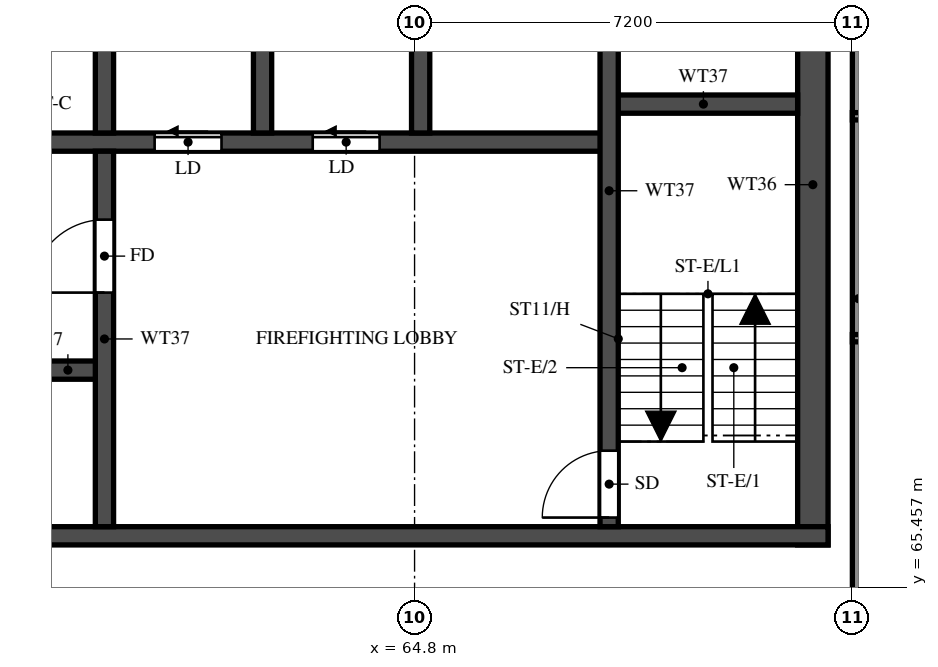
"""IFC4 building model, lengths in metres.
Left out: names, types, materials, properties, quantities, classifications, styles, units other than length and angle.
Written with IfcOpenShell. Run it as: python <this file> out.ifc"""

import sys

from ifc_helpers import new_model, si_unit, direction, frame, frame_2d, origin, place, context, subcontext, project, spatial, rectangle, extrude, element, fill, save


model = new_model("IFC4")
c1 = context("Model", 3, precision=1e-05, world=origin(), true_north=direction((0.0, 1.0)))
c2 = subcontext(c1, "Body", "Model", "MODEL_VIEW")
j1 = project(units=[si_unit("LENGTHUNIT", "METRE"), si_unit("PLANEANGLEUNIT", "RADIAN")], contexts=[c1])
p1 = place(None, origin())
s1 = spatial("IfcSite", under=j1, at=p1, CompositionType="ELEMENT")
p2 = place(p1, origin())
s2 = spatial("IfcBuilding", under=s1, at=p2, CompositionType="ELEMENT")
p3 = place(p2, frame((0.0, 0.0, 229.0)))
s3 = spatial("IfcBuildingStorey", under=s2, at=p3, CompositionType="ELEMENT", Elevation=229.0)
p4 = place(p3, frame((71.35, 66.15, 0.0), z_axis=(0.0, 0.0, 1.0), x_axis=(0.0, 1.0, 0.0)))
e1 = element("IfcWall", 1, at=p4, inside=s3, PredefinedType="SHEAR", context=c2, shape_type="SweptSolid", body=[
    extrude(rectangle(XDim=11.85, YDim=0.5, at=frame_2d((5.925, 0.0))), origin(), (0.0, 0.0, 1.0), 3.22),
])
p5 = place(p3, frame((29.2, 66.3, 0.0), z_axis=(0.0, 0.0, 1.0), x_axis=(1.0, 0.0, 0.0)))
e2 = element("IfcWall", 2, at=p5, inside=s3, PredefinedType="SHEAR", context=c2, shape_type="SweptSolid", body=[
    extrude(rectangle(XDim=42.4, YDim=0.3, at=frame_2d((21.2, 0.0))), origin(), (0.0, 0.0, 1.0), 3.22),
])
p6 = place(p5, frame((1.425, 0.0, 0.0)))
e3 = element("IfcOpeningElement", 3, at=p6, cuts=e2, PredefinedType="OPENING", context=c2, shape_type="SweptSolid", body=[
    extrude(rectangle(XDim=1.1, YDim=2.1, at=frame_2d((0.55, 1.05))), frame((0.0, 0.16, 0.0), z_axis=(0.0, -1.0, 0.0), x_axis=(1.0, 0.0, 0.0)), (0.0, 0.0, 1.0), 0.32),
])
p7 = place(p5, frame((4.2, 0.0, 0.0)))
e4 = element("IfcOpeningElement", 4, at=p7, cuts=e2, PredefinedType="OPENING", context=c2, shape_type="SweptSolid", body=[
    extrude(rectangle(XDim=1.8, YDim=2.1, at=frame_2d((0.9, 1.05))), frame((0.0, 0.16, 0.0), z_axis=(0.0, -1.0, 0.0), x_axis=(1.0, 0.0, 0.0)), (0.0, 0.0, 1.0), 0.32),
])
p8 = place(p3, frame((35.65, 69.025, 0.0), z_axis=(0.0, 0.0, 1.0), x_axis=(1.0, 0.0, 0.0)))
e5 = element("IfcWall", 5, at=p8, inside=s3, PredefinedType="SHEAR", context=c2, shape_type="SweptSolid", body=[
    extrude(rectangle(XDim=24.05, YDim=0.3, at=frame_2d((12.025, 0.0))), origin(), (0.0, 0.0, 1.0), 3.22),
])
p9 = place(p8, frame((0.975, 0.0, 0.0)))
e6 = element("IfcOpeningElement", 6, at=p9, cuts=e5, PredefinedType="OPENING", context=c2, shape_type="SweptSolid", body=[
    extrude(rectangle(XDim=1.1, YDim=2.1, at=frame_2d((0.55, 1.05))), frame((0.0, 0.16, 0.0), z_axis=(0.0, -1.0, 0.0), x_axis=(1.0, 0.0, 0.0)), (0.0, 0.0, 1.0), 0.32),
])
p10 = place(p8, frame((3.725, 0.0, 0.0)))
e7 = element("IfcOpeningElement", 7, at=p10, cuts=e5, PredefinedType="OPENING", context=c2, shape_type="SweptSolid", body=[
    extrude(rectangle(XDim=1.1, YDim=2.1, at=frame_2d((0.55, 1.05))), frame((0.0, 0.16, 0.0), z_axis=(0.0, -1.0, 0.0), x_axis=(1.0, 0.0, 0.0)), (0.0, 0.0, 1.0), 0.32),
])
p11 = place(p8, frame((6.475, 0.0, 0.0)))
e8 = element("IfcOpeningElement", 8, at=p11, cuts=e5, PredefinedType="OPENING", context=c2, shape_type="SweptSolid", body=[
    extrude(rectangle(XDim=1.1, YDim=2.1, at=frame_2d((0.55, 1.05))), frame((0.0, 0.16, 0.0), z_axis=(0.0, -1.0, 0.0), x_axis=(1.0, 0.0, 0.0)), (0.0, 0.0, 1.0), 0.32),
])
p12 = place(p8, frame((9.225, 0.0, 0.0)))
e9 = element("IfcOpeningElement", 9, at=p12, cuts=e5, PredefinedType="OPENING", context=c2, shape_type="SweptSolid", body=[
    extrude(rectangle(XDim=1.1, YDim=2.1, at=frame_2d((0.55, 1.05))), frame((0.0, 0.16, 0.0), z_axis=(0.0, -1.0, 0.0), x_axis=(1.0, 0.0, 0.0)), (0.0, 0.0, 1.0), 0.32),
])
p13 = place(p8, frame((11.975, 0.0, 0.0)))
e10 = element("IfcOpeningElement", 10, at=p13, cuts=e5, PredefinedType="OPENING", context=c2, shape_type="SweptSolid", body=[
    extrude(rectangle(XDim=1.1, YDim=2.1, at=frame_2d((0.55, 1.05))), frame((0.0, 0.16, 0.0), z_axis=(0.0, -1.0, 0.0), x_axis=(1.0, 0.0, 0.0)), (0.0, 0.0, 1.0), 0.32),
])
p14 = place(p8, frame((14.725, 0.0, 0.0)))
e11 = element("IfcOpeningElement", 11, at=p14, cuts=e5, PredefinedType="OPENING", context=c2, shape_type="SweptSolid", body=[
    extrude(rectangle(XDim=1.1, YDim=2.1, at=frame_2d((0.55, 1.05))), frame((0.0, 0.16, 0.0), z_axis=(0.0, -1.0, 0.0), x_axis=(1.0, 0.0, 0.0)), (0.0, 0.0, 1.0), 0.32),
])
p15 = place(p8, frame((17.6, 0.0, 0.0)))
e12 = element("IfcOpeningElement", 12, at=p15, cuts=e5, PredefinedType="OPENING", context=c2, shape_type="SweptSolid", body=[
    extrude(rectangle(XDim=1.1, YDim=2.1, at=frame_2d((0.55, 1.05))), frame((0.0, 0.16, 0.0), z_axis=(0.0, -1.0, 0.0), x_axis=(1.0, 0.0, 0.0)), (0.0, 0.0, 1.0), 0.32),
])
p16 = place(p8, frame((20.6, 0.0, 0.0)))
e13 = element("IfcOpeningElement", 13, at=p16, cuts=e5, PredefinedType="OPENING", context=c2, shape_type="SweptSolid", body=[
    extrude(rectangle(XDim=1.1, YDim=2.1, at=frame_2d((0.55, 1.05))), frame((0.0, 0.16, 0.0), z_axis=(0.0, -1.0, 0.0), x_axis=(1.0, 0.0, 0.0)), (0.0, 0.0, 1.0), 0.32),
])
p17 = place(p3, frame((32.8, 72.775, 0.0), z_axis=(0.0, 0.0, 1.0), x_axis=(1.0, 0.0, 0.0)))
e14 = element("IfcWall", 14, at=p17, inside=s3, PredefinedType="SHEAR", context=c2, shape_type="SweptSolid", body=[
    extrude(rectangle(XDim=35.2, YDim=0.3, at=frame_2d((17.6, 0.0))), origin(), (0.0, 0.0, 1.0), 3.22),
])
p18 = place(p17, frame((19.8, 0.0, 0.0)))
e15 = element("IfcOpeningElement", 15, at=p18, cuts=e14, PredefinedType="OPENING", context=c2, shape_type="SweptSolid", body=[
    extrude(rectangle(XDim=1.1, YDim=2.1, at=frame_2d((0.55, 1.05))), frame((0.0, 0.16, 0.0), z_axis=(0.0, -1.0, 0.0), x_axis=(1.0, 0.0, 0.0)), (0.0, 0.0, 1.0), 0.32),
])
p19 = place(p17, frame((27.725, 0.0, 0.0)))
e16 = element("IfcOpeningElement", 16, at=p19, cuts=e14, PredefinedType="OPENING", context=c2, shape_type="SweptSolid", body=[
    extrude(rectangle(XDim=1.1, YDim=2.1, at=frame_2d((0.55, 1.05))), frame((0.0, 0.16, 0.0), z_axis=(0.0, -1.0, 0.0), x_axis=(1.0, 0.0, 0.0)), (0.0, 0.0, 1.0), 0.32),
])
p20 = place(p17, frame((30.325, 0.0, 0.0)))
e17 = element("IfcOpeningElement", 17, at=p20, cuts=e14, PredefinedType="OPENING", context=c2, shape_type="SweptSolid", body=[
    extrude(rectangle(XDim=1.1, YDim=2.1, at=frame_2d((0.55, 1.05))), frame((0.0, 0.16, 0.0), z_axis=(0.0, -1.0, 0.0), x_axis=(1.0, 0.0, 0.0)), (0.0, 0.0, 1.0), 0.32),
])
p21 = place(p17, frame((3.825, 0.0, 0.0)))
e18 = element("IfcOpeningElement", 18, at=p21, cuts=e14, PredefinedType="OPENING", context=c2, shape_type="SweptSolid", body=[
    extrude(rectangle(XDim=1.1, YDim=2.1, at=frame_2d((0.55, 1.05))), frame((0.0, 0.16, 0.0), z_axis=(0.0, -1.0, 0.0), x_axis=(1.0, 0.0, 0.0)), (0.0, 0.0, 1.0), 0.32),
])
p22 = place(p17, frame((6.575, 0.0, 0.0)))
e19 = element("IfcOpeningElement", 19, at=p22, cuts=e14, PredefinedType="OPENING", context=c2, shape_type="SweptSolid", body=[
    extrude(rectangle(XDim=1.1, YDim=2.1, at=frame_2d((0.55, 1.05))), frame((0.0, 0.16, 0.0), z_axis=(0.0, -1.0, 0.0), x_axis=(1.0, 0.0, 0.0)), (0.0, 0.0, 1.0), 0.32),
])
p23 = place(p17, frame((9.325, 0.0, 0.0)))
e20 = element("IfcOpeningElement", 20, at=p23, cuts=e14, PredefinedType="OPENING", context=c2, shape_type="SweptSolid", body=[
    extrude(rectangle(XDim=1.1, YDim=2.1, at=frame_2d((0.55, 1.05))), frame((0.0, 0.16, 0.0), z_axis=(0.0, -1.0, 0.0), x_axis=(1.0, 0.0, 0.0)), (0.0, 0.0, 1.0), 0.32),
])
p24 = place(p17, frame((12.075, 0.0, 0.0)))
e21 = element("IfcOpeningElement", 21, at=p24, cuts=e14, PredefinedType="OPENING", context=c2, shape_type="SweptSolid", body=[
    extrude(rectangle(XDim=1.1, YDim=2.1, at=frame_2d((0.55, 1.05))), frame((0.0, 0.16, 0.0), z_axis=(0.0, -1.0, 0.0), x_axis=(1.0, 0.0, 0.0)), (0.0, 0.0, 1.0), 0.32),
])
p25 = place(p17, frame((14.825, 0.0, 0.0)))
e22 = element("IfcOpeningElement", 22, at=p25, cuts=e14, PredefinedType="OPENING", context=c2, shape_type="SweptSolid", body=[
    extrude(rectangle(XDim=1.1, YDim=2.1, at=frame_2d((0.55, 1.05))), frame((0.0, 0.16, 0.0), z_axis=(0.0, -1.0, 0.0), x_axis=(1.0, 0.0, 0.0)), (0.0, 0.0, 1.0), 0.32),
])
p26 = place(p17, frame((17.575, 0.0, 0.0)))
e23 = element("IfcOpeningElement", 23, at=p26, cuts=e14, PredefinedType="OPENING", context=c2, shape_type="SweptSolid", body=[
    extrude(rectangle(XDim=1.1, YDim=2.1, at=frame_2d((0.55, 1.05))), frame((0.0, 0.16, 0.0), z_axis=(0.0, -1.0, 0.0), x_axis=(1.0, 0.0, 0.0)), (0.0, 0.0, 1.0), 0.32),
])
p27 = place(p17, frame((0.95, 0.0, 0.0)))
e24 = element("IfcOpeningElement", 24, at=p27, cuts=e14, PredefinedType="OPENING", context=c2, shape_type="SweptSolid", body=[
    extrude(rectangle(XDim=1.1, YDim=2.1, at=frame_2d((0.55, 1.05))), frame((0.0, 0.16, 0.0), z_axis=(0.0, -1.0, 0.0), x_axis=(1.0, 0.0, 0.0)), (0.0, 0.0, 1.0), 0.32),
])
p28 = place(p3, frame((68.0, 73.4, 0.0), z_axis=(0.0, 0.0, 1.0), x_axis=(1.0, 0.0, 0.0)))
e25 = element("IfcWall", 25, at=p28, inside=s3, PredefinedType="SHEAR", context=c2, shape_type="SweptSolid", body=[
    extrude(rectangle(XDim=3.1, YDim=0.3, at=frame_2d((1.55, 0.0))), origin(), (0.0, 0.0, 1.0), 3.22),
])
p29 = place(p3, frame((68.0, 66.45, 0.0), z_axis=(0.0, 0.0, 1.0), x_axis=(0.0, 1.0, 0.0)))
e26 = element("IfcWall", 26, at=p29, inside=s3, PredefinedType="SHEAR", context=c2, shape_type="SweptSolid", body=[
    extrude(rectangle(XDim=11.05, YDim=0.3, at=frame_2d((5.525, 0.0))), origin(), (0.0, 0.0, 1.0), 3.22),
])
p30 = place(p29, frame((0.15, 0.0, 0.0)))
e27 = element("IfcOpeningElement", 27, at=p30, cuts=e26, PredefinedType="OPENING", context=c2, shape_type="SweptSolid", body=[
    extrude(rectangle(XDim=1.1, YDim=2.1, at=frame_2d((0.55, 1.05))), frame((0.0, 0.16, 0.0), z_axis=(0.0, -1.0, 0.0), x_axis=(1.0, 0.0, 0.0)), (0.0, 0.0, 1.0), 0.32),
])
p31 = place(p3, frame((59.7, 66.45, 0.0), z_axis=(0.0, 0.0, 1.0), x_axis=(0.0, 1.0, 0.0)))
e28 = element("IfcWall", 28, at=p31, inside=s3, PredefinedType="SHEAR", context=c2, shape_type="SweptSolid", body=[
    extrude(rectangle(XDim=6.175, YDim=0.3, at=frame_2d((3.087, 0.0))), origin(), (0.0, 0.0, 1.0), 3.22),
])
p32 = place(p31, frame((3.85, 0.0, 0.0)))
e29 = element("IfcOpeningElement", 29, at=p32, cuts=e28, PredefinedType="OPENING", context=c2, shape_type="SweptSolid", body=[
    extrude(rectangle(XDim=1.2, YDim=2.1, at=frame_2d((0.6, 1.05))), frame((0.0, 0.16, 0.0), z_axis=(0.0, -1.0, 0.0), x_axis=(1.0, 0.0, 0.0)), (0.0, 0.0, 1.0), 0.32),
])
for number, where, z_axis, x_axis in (
    (30, (59.7, 72.925, 0.0), (0.0, 0.0, 1.0), (0.0, 1.0, 0.0)),
    (31, (62.3, 72.925, 0.0), (0.0, 0.0, 1.0), (0.0, 1.0, 0.0)),
    (32, (64.9, 72.925, 0.0), (0.0, 0.0, 1.0), (0.0, 1.0, 0.0)),
):
    element("IfcWall", number, at=place(p3, frame(where, z_axis=z_axis, x_axis=x_axis)), inside=s3, PredefinedType="SHEAR", context=c2, shape_type="SweptSolid", body=[
        extrude(rectangle(XDim=2.95, YDim=0.3, at=frame_2d((1.475, 0.0))), origin(), (0.0, 0.0, 1.0), 3.22),
    ])
p33 = place(p3, frame((72.1, 62.4, 0.0), z_axis=(0.0, 0.0, 1.0), x_axis=(0.0, 1.0, 0.0)))
e33 = element("IfcWall", 33, at=p33, inside=s3, PredefinedType="SOLIDWALL", context=c2, shape_type="SweptSolid", body=[
    extrude(rectangle(XDim=15.6, YDim=0.2, at=frame_2d((7.8, 0.0))), origin(), (0.0, 0.0, 1.0), 3.22),
])
p34 = place(p3, frame((72.0, 69.55, 0.0), z_axis=(0.0, 0.0, 1.0), x_axis=(1.0, 0.0, 0.0)))
e34 = element("IfcWall", 34, at=p34, inside=s3, PredefinedType="PARTITIONING", context=c2, shape_type="SweptSolid", body=[
    extrude(rectangle(XDim=3.5, YDim=0.12, at=frame_2d((1.75, 0.0))), origin(), (0.0, 0.0, 1.0), 3.22),
])
p35 = place(p3, frame((72.0, 73.2, 0.0), z_axis=(0.0, 0.0, 1.0), x_axis=(1.0, 0.0, 0.0)))
e35 = element("IfcWall", 35, at=p35, inside=s3, PredefinedType="PARTITIONING", context=c2, shape_type="SweptSolid", body=[
    extrude(rectangle(XDim=10.275, YDim=0.12, at=frame_2d((5.137, 0.0))), origin(), (0.0, 0.0, 1.0), 2.32),
])
p36 = place(p35, frame((4.1, 0.0, 0.0)))
e36 = element("IfcOpeningElement", 36, at=p36, cuts=e35, PredefinedType="OPENING", context=c2, shape_type="SweptSolid", body=[
    extrude(rectangle(XDim=0.9, YDim=2.1, at=frame_2d((0.45, 1.05))), frame((0.0, 0.07, 0.0), z_axis=(0.0, -1.0, 0.0), x_axis=(1.0, 0.0, 0.0)), (0.0, 0.0, 1.0), 0.14),
])
p37 = place(p30, origin())
e37 = element("IfcDoor", 37, at=p37, inside=s3, OperationType="SINGLE_SWING_RIGHT", PredefinedType="DOOR", context=c2, shape_type="SweptSolid", body=[
    extrude(rectangle(XDim=1.1, YDim=2.1, at=frame_2d((0.55, 1.05))), frame((0.0, 0.025, 0.0), z_axis=(0.0, -1.0, 0.0), x_axis=(1.0, 0.0, 0.0)), (0.0, 0.0, 1.0), 0.05),
])
fill(e27, e37)
p38 = place(p32, origin())
e38 = element("IfcDoor", 38, at=p38, inside=s3, OperationType="SINGLE_SWING_LEFT", PredefinedType="DOOR", context=c2, shape_type="SweptSolid", body=[
    extrude(rectangle(XDim=1.2, YDim=2.1, at=frame_2d((0.6, 1.05))), frame((0.0, 0.025, 0.0), z_axis=(0.0, -1.0, 0.0), x_axis=(1.0, 0.0, 0.0)), (0.0, 0.0, 1.0), 0.05),
])
fill(e29, e38)
p39 = place(p19, origin())
e39 = element("IfcDoor", 39, at=p39, inside=s3, OperationType="SLIDING_TO_LEFT", PredefinedType="DOOR", context=c2, shape_type="SweptSolid", body=[
    extrude(rectangle(XDim=1.1, YDim=2.1, at=frame_2d((0.55, 1.05))), frame((0.0, 0.025, 0.0), z_axis=(0.0, -1.0, 0.0), x_axis=(1.0, 0.0, 0.0)), (0.0, 0.0, 1.0), 0.05),
])
fill(e16, e39)
p40 = place(p20, origin())
e40 = element("IfcDoor", 40, at=p40, inside=s3, OperationType="SLIDING_TO_LEFT", PredefinedType="DOOR", context=c2, shape_type="SweptSolid", body=[
    extrude(rectangle(XDim=1.1, YDim=2.1, at=frame_2d((0.55, 1.05))), frame((0.0, 0.025, 0.0), z_axis=(0.0, -1.0, 0.0), x_axis=(1.0, 0.0, 0.0)), (0.0, 0.0, 1.0), 0.05),
])
fill(e17, e40)
save(model, sys.argv[1])
